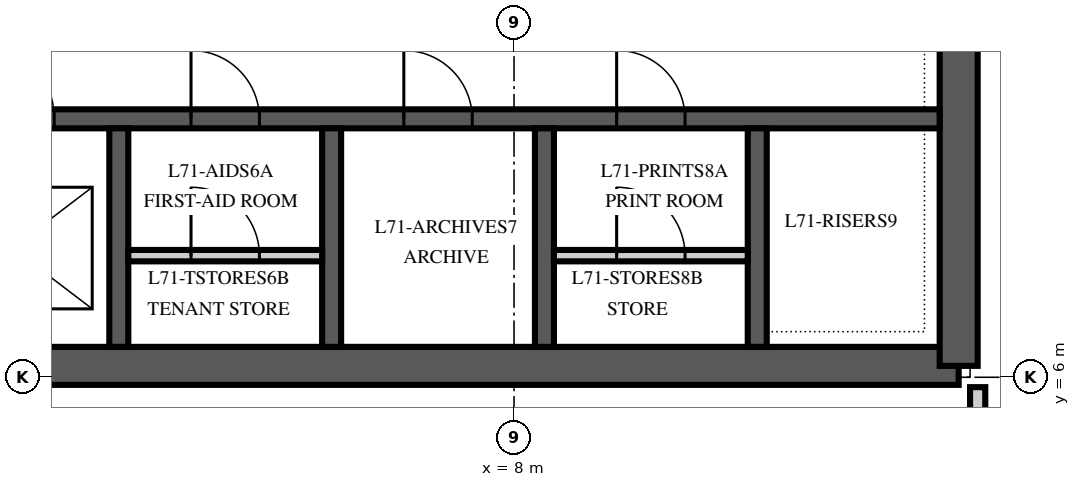
"""IFC4 building model, lengths in metres.
Left out: names, types, materials, properties, quantities, classifications, styles, units other than length and angle.
Written with IfcOpenShell. Run it as: python <this file> out.ifc"""

import sys

from ifc_helpers import new_model, si_unit, direction, frame, frame_2d, origin, place, context, subcontext, project, spatial, polyline, rectangle, outline, extrude, element, fill, save


model = new_model("IFC4")
c1 = context("Model", 3, precision=1e-05, world=origin(), true_north=direction((0.0, 1.0)))
c2 = subcontext(c1, "Body", "Model", "MODEL_VIEW")
j1 = project(units=[si_unit("LENGTHUNIT", "METRE"), si_unit("PLANEANGLEUNIT", "RADIAN")], contexts=[c1])
p1 = place(None, origin())
s1 = spatial("IfcSite", under=j1, at=p1, CompositionType="ELEMENT")
p2 = place(p1, origin())
s2 = spatial("IfcBuilding", under=s1, at=p2, CompositionType="ELEMENT")
p3 = place(p2, frame((0.0, 0.0, 304.0)))
s3 = spatial("IfcBuildingStorey", under=s2, at=p3, CompositionType="ELEMENT", Elevation=304.0)
p4 = place(p3, frame((-13.85, 6.15, 0.0), z_axis=(0.0, 0.0, 1.0), x_axis=(1.0, 0.0, 0.0)))
e1 = element("IfcWall", 1, at=p4, inside=s3, PredefinedType="SHEAR", context=c2, shape_type="SweptSolid", body=[
    extrude(rectangle(XDim=27.7, YDim=0.5, at=frame_2d((13.85, 0.0))), origin(), (0.0, 0.0, 1.0), 4.0),
])
p5 = place(p3, frame((13.85, 6.15, 0.0), z_axis=(0.0, 0.0, 1.0), x_axis=(0.0, 1.0, 0.0)))
e2 = element("IfcWall", 2, at=p5, inside=s3, PredefinedType="SHEAR", context=c2, shape_type="SweptSolid", body=[
    extrude(outline(polyline([(0.0, -0.25), (17.7, -0.25), (17.7, 0.0), (17.45, 0.0), (17.45, 0.25), (0.25, 0.25), (0.25, 0.0), (0.0, 0.0), (0.0, -0.25)])), origin(), (0.0, 0.0, 1.0), 4.0),
])
p6 = place(p5, frame((4.15, 0.0, 0.0)))
e3 = element("IfcOpeningElement", 3, at=p6, cuts=e2, PredefinedType="OPENING", context=c2, shape_type="SweptSolid", body=[
    extrude(rectangle(XDim=1.8, YDim=2.4, at=frame_2d((0.9, 1.2))), frame((0.0, 0.265, 0.0), z_axis=(0.0, -1.0, 0.0), x_axis=(1.0, 0.0, 0.0)), (0.0, 0.0, 1.0), 0.53),
])
p7 = place(p3, frame((-13.6, 9.4, 0.0), z_axis=(0.0, 0.0, 1.0), x_axis=(1.0, 0.0, 0.0)))
e4 = element("IfcWall", 4, at=p7, inside=s3, PredefinedType="SHEAR", context=c2, shape_type="SweptSolid", body=[
    extrude(rectangle(XDim=27.2, YDim=0.25, at=frame_2d((13.6, 0.0))), origin(), (0.0, 0.0, 1.0), 4.0),
])
p8 = place(p7, frame((8.85, 0.0, 0.0)))
e5 = element("IfcOpeningElement", 5, at=p8, cuts=e4, PredefinedType="OPENING", context=c2, shape_type="SweptSolid", body=[
    extrude(rectangle(XDim=1.1, YDim=2.1, at=frame_2d((0.55, 1.05))), frame((0.0, 0.14, 0.0), z_axis=(0.0, -1.0, 0.0), x_axis=(1.0, 0.0, 0.0)), (0.0, 0.0, 1.0), 0.28),
])
p9 = place(p7, frame((11.65, 0.0, 0.0)))
e6 = element("IfcOpeningElement", 6, at=p9, cuts=e4, PredefinedType="OPENING", context=c2, shape_type="SweptSolid", body=[
    extrude(rectangle(XDim=1.1, YDim=2.1, at=frame_2d((0.55, 1.05))), frame((0.0, 0.14, 0.0), z_axis=(0.0, -1.0, 0.0), x_axis=(1.0, 0.0, 0.0)), (0.0, 0.0, 1.0), 0.28),
])
p10 = place(p7, frame((14.45, 0.0, 0.0)))
e7 = element("IfcOpeningElement", 7, at=p10, cuts=e4, PredefinedType="OPENING", context=c2, shape_type="SweptSolid", body=[
    extrude(rectangle(XDim=1.1, YDim=2.1, at=frame_2d((0.55, 1.05))), frame((0.0, 0.14, 0.0), z_axis=(0.0, -1.0, 0.0), x_axis=(1.0, 0.0, 0.0)), (0.0, 0.0, 1.0), 0.28),
])
p11 = place(p7, frame((0.55, 0.0, 0.0)))
e8 = element("IfcOpeningElement", 8, at=p11, cuts=e4, PredefinedType="OPENING", context=c2, shape_type="SweptSolid", body=[
    extrude(rectangle(XDim=0.9, YDim=2.1, at=frame_2d((0.45, 1.05))), frame((0.0, 0.14, 0.0), z_axis=(0.0, -1.0, 0.0), x_axis=(1.0, 0.0, 0.0)), (0.0, 0.0, 1.0), 0.28),
])
p12 = place(p7, frame((3.35, 0.0, 0.0)))
e9 = element("IfcOpeningElement", 9, at=p12, cuts=e4, PredefinedType="OPENING", context=c2, shape_type="SweptSolid", body=[
    extrude(rectangle(XDim=0.9, YDim=2.1, at=frame_2d((0.45, 1.05))), frame((0.0, 0.14, 0.0), z_axis=(0.0, -1.0, 0.0), x_axis=(1.0, 0.0, 0.0)), (0.0, 0.0, 1.0), 0.28),
])
p13 = place(p7, frame((6.15, 0.0, 0.0)))
e10 = element("IfcOpeningElement", 10, at=p13, cuts=e4, PredefinedType="OPENING", context=c2, shape_type="SweptSolid", body=[
    extrude(rectangle(XDim=0.9, YDim=2.1, at=frame_2d((0.45, 1.05))), frame((0.0, 0.14, 0.0), z_axis=(0.0, -1.0, 0.0), x_axis=(1.0, 0.0, 0.0)), (0.0, 0.0, 1.0), 0.28),
])
p14 = place(p7, frame((17.35, 0.0, 0.0)))
e11 = element("IfcOpeningElement", 11, at=p14, cuts=e4, PredefinedType="OPENING", context=c2, shape_type="SweptSolid", body=[
    extrude(rectangle(XDim=0.9, YDim=2.1, at=frame_2d((0.45, 1.05))), frame((0.0, 0.14, 0.0), z_axis=(0.0, -1.0, 0.0), x_axis=(1.0, 0.0, 0.0)), (0.0, 0.0, 1.0), 0.28),
])
p15 = place(p7, frame((20.15, 0.0, 0.0)))
e12 = element("IfcOpeningElement", 12, at=p15, cuts=e4, PredefinedType="OPENING", context=c2, shape_type="SweptSolid", body=[
    extrude(rectangle(XDim=0.9, YDim=2.1, at=frame_2d((0.45, 1.05))), frame((0.0, 0.14, 0.0), z_axis=(0.0, -1.0, 0.0), x_axis=(1.0, 0.0, 0.0)), (0.0, 0.0, 1.0), 0.28),
])
p16 = place(p7, frame((22.95, 0.0, 0.0)))
e13 = element("IfcOpeningElement", 13, at=p16, cuts=e4, PredefinedType="OPENING", context=c2, shape_type="SweptSolid", body=[
    extrude(rectangle(XDim=0.9, YDim=2.1, at=frame_2d((0.45, 1.05))), frame((0.0, 0.14, 0.0), z_axis=(0.0, -1.0, 0.0), x_axis=(1.0, 0.0, 0.0)), (0.0, 0.0, 1.0), 0.28),
])
for number, where, z_axis, x_axis in (
    (14, (2.8, 6.4, 0.0), (0.0, 0.0, 1.0), (0.0, 1.0, 0.0)),
    (15, (5.6, 6.4, 0.0), (0.0, 0.0, 1.0), (0.0, 1.0, 0.0)),
    (16, (8.4, 6.4, 0.0), (0.0, 0.0, 1.0), (0.0, 1.0, 0.0)),
    (17, (11.2, 6.4, 0.0), (0.0, 0.0, 1.0), (0.0, 1.0, 0.0)),
):
    element("IfcWall", number, at=place(p3, frame(where, z_axis=z_axis, x_axis=x_axis)), inside=s3, PredefinedType="SHEAR", context=c2, shape_type="SweptSolid", body=[
        extrude(rectangle(XDim=2.875, YDim=0.25, at=frame_2d((1.438, 0.0))), origin(), (0.0, 0.0, 1.0), 4.0),
    ])
p17 = place(p3, frame((2.925, 7.6, 0.0), z_axis=(0.0, 0.0, 1.0), x_axis=(1.0, 0.0, 0.0)))
e18 = element("IfcWall", 18, at=p17, inside=s3, PredefinedType="PARTITIONING", context=c2, shape_type="SweptSolid", body=[
    extrude(rectangle(XDim=2.55, YDim=0.15, at=frame_2d((1.275, 0.0))), origin(), (0.0, 0.0, 1.0), 3.85),
])
p18 = place(p17, frame((0.825, 0.0, 0.0)))
e19 = element("IfcOpeningElement", 19, at=p18, cuts=e18, PredefinedType="OPENING", context=c2, shape_type="SweptSolid", body=[
    extrude(rectangle(XDim=0.9, YDim=2.1, at=frame_2d((0.45, 1.05))), frame((0.0, 0.09, 0.0), z_axis=(0.0, -1.0, 0.0), x_axis=(1.0, 0.0, 0.0)), (0.0, 0.0, 1.0), 0.18),
])
p19 = place(p3, frame((8.525, 7.6, 0.0), z_axis=(0.0, 0.0, 1.0), x_axis=(1.0, 0.0, 0.0)))
e20 = element("IfcWall", 20, at=p19, inside=s3, PredefinedType="PARTITIONING", context=c2, shape_type="SweptSolid", body=[
    extrude(rectangle(XDim=2.55, YDim=0.15, at=frame_2d((1.275, 0.0))), origin(), (0.0, 0.0, 1.0), 3.85),
])
p20 = place(p19, frame((0.825, 0.0, 0.0)))
e21 = element("IfcOpeningElement", 21, at=p20, cuts=e20, PredefinedType="OPENING", context=c2, shape_type="SweptSolid", body=[
    extrude(rectangle(XDim=0.9, YDim=2.1, at=frame_2d((0.45, 1.05))), frame((0.0, 0.09, 0.0), z_axis=(0.0, -1.0, 0.0), x_axis=(1.0, 0.0, 0.0)), (0.0, 0.0, 1.0), 0.18),
])
p21 = place(p3, frame((14.1, 4.05, 0.0), z_axis=(0.0, 0.0, 1.0), x_axis=(0.0, 1.0, 0.0)))
e22 = element("IfcWall", 22, at=p21, inside=s3, PredefinedType="PARTITIONING", context=c2, shape_type="SweptSolid", body=[
    extrude(rectangle(XDim=1.82, YDim=0.2, at=frame_2d((0.91, 0.0))), origin(), (0.0, 0.0, 1.0), 2.15),
])
p22 = place(p10, origin())
e23 = element("IfcDoor", 23, at=p22, inside=s3, OperationType="SLIDING_TO_LEFT", PredefinedType="DOOR", context=c2, shape_type="SweptSolid", body=[
    extrude(rectangle(XDim=1.1, YDim=2.1, at=frame_2d((0.55, 1.05))), frame((0.0, 0.125, 0.0), z_axis=(0.0, -1.0, 0.0), x_axis=(1.0, 0.0, 0.0)), (0.0, 0.0, 1.0), 0.25),
])
fill(e7, e23)
p23 = place(p14, origin())
e24 = element("IfcDoor", 24, at=p23, inside=s3, OperationType="SINGLE_SWING_LEFT", PredefinedType="DOOR", context=c2, shape_type="SweptSolid", body=[
    extrude(rectangle(XDim=0.9, YDim=2.1, at=frame_2d((0.45, 1.05))), frame((0.0, 0.125, 0.0), z_axis=(0.0, -1.0, 0.0), x_axis=(1.0, 0.0, 0.0)), (0.0, 0.0, 1.0), 0.25),
])
fill(e11, e24)
p24 = place(p18, origin())
e25 = element("IfcDoor", 25, at=p24, inside=s3, OperationType="SINGLE_SWING_LEFT", PredefinedType="DOOR", context=c2, shape_type="SweptSolid", body=[
    extrude(rectangle(XDim=0.9, YDim=2.1, at=frame_2d((0.45, 1.05))), frame((0.0, 0.075, 0.0), z_axis=(0.0, -1.0, 0.0), x_axis=(1.0, 0.0, 0.0)), (0.0, 0.0, 1.0), 0.149),
])
fill(e19, e25)
p25 = place(p15, origin())
e26 = element("IfcDoor", 26, at=p25, inside=s3, OperationType="SINGLE_SWING_LEFT", PredefinedType="DOOR", context=c2, shape_type="SweptSolid", body=[
    extrude(rectangle(XDim=0.9, YDim=2.1, at=frame_2d((0.45, 1.05))), frame((0.0, 0.125, 0.0), z_axis=(0.0, -1.0, 0.0), x_axis=(1.0, 0.0, 0.0)), (0.0, 0.0, 1.0), 0.25),
])
fill(e12, e26)
p26 = place(p16, origin())
e27 = element("IfcDoor", 27, at=p26, inside=s3, OperationType="SINGLE_SWING_LEFT", PredefinedType="DOOR", context=c2, shape_type="SweptSolid", body=[
    extrude(rectangle(XDim=0.9, YDim=2.1, at=frame_2d((0.45, 1.05))), frame((0.0, 0.125, 0.0), z_axis=(0.0, -1.0, 0.0), x_axis=(1.0, 0.0, 0.0)), (0.0, 0.0, 1.0), 0.25),
])
fill(e13, e27)
p27 = place(p20, origin())
e28 = element("IfcDoor", 28, at=p27, inside=s3, OperationType="SINGLE_SWING_LEFT", PredefinedType="DOOR", context=c2, shape_type="SweptSolid", body=[
    extrude(rectangle(XDim=0.9, YDim=2.1, at=frame_2d((0.45, 1.05))), frame((0.0, 0.075, 0.0), z_axis=(0.0, -1.0, 0.0), x_axis=(1.0, 0.0, 0.0)), (0.0, 0.0, 1.0), 0.149),
])
fill(e21, e28)
save(model, sys.argv[1])
